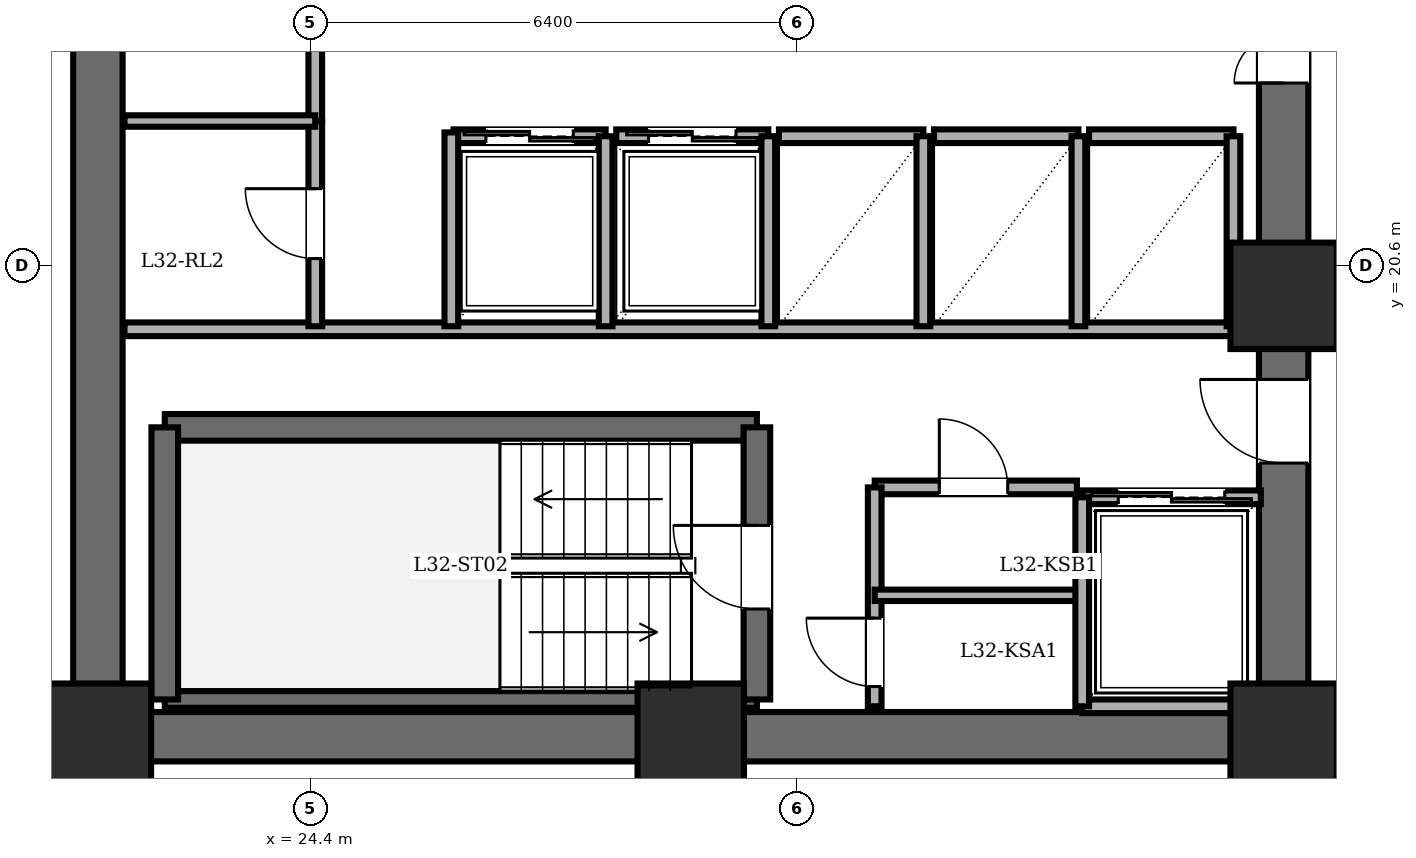
"""IFC4 building model, lengths in metres.
Left out: names, types, materials, properties, quantities, classifications, styles, units other than length and angle.
Written with IfcOpenShell. Run it as: python <this file> out.ifc"""

import sys

from ifc_helpers import new_model, si_unit, direction, frame, frame_2d, origin, origin_2d, place, context, subcontext, project, spatial, rectangle, extrude, element, fill, save


model = new_model("IFC4")
c1 = context("Model", 3, precision=1e-05, world=origin(), true_north=direction((0.0, 1.0)))
c2 = subcontext(c1, "Body", "Model", "MODEL_VIEW")
j1 = project(units=[si_unit("LENGTHUNIT", "METRE"), si_unit("PLANEANGLEUNIT", "RADIAN")], contexts=[c1])
p1 = place(None, origin())
s1 = spatial("IfcSite", under=j1, at=p1, CompositionType="ELEMENT")
p2 = place(p1, origin())
s2 = spatial("IfcBuilding", under=s1, at=p2, CompositionType="ELEMENT")
p3 = place(p2, frame((0.0, 0.0, 122.3)))
s3 = spatial("IfcBuildingStorey", under=s2, at=p3, CompositionType="ELEMENT", Elevation=122.3)
for number, where, z_axis, x_axis in (
    (1, (21.6, 14.4, 0.0), (0.0, 0.0, 1.0), (1.0, 0.0, 0.0)),
    (2, (29.4, 14.4, 0.0), (0.0, 0.0, 1.0), (1.0, 0.0, 0.0)),
    (3, (37.2, 14.4, 0.0), (0.0, 0.0, 1.0), (1.0, 0.0, 0.0)),
    (4, (37.2, 20.2, 0.0), (0.0, 0.0, 1.0), (1.0, 0.0, 0.0)),
):
    element("IfcColumn", number, at=place(p3, frame(where, z_axis=z_axis, x_axis=x_axis)), inside=s3, PredefinedType="COLUMN", context=c2, shape_type="SweptSolid", body=[
        extrude(rectangle(XDim=1.4, YDim=1.4, at=origin_2d()), origin(), (0.0, 0.0, 1.0), 3.6),
    ])
p4 = place(p3, frame((21.6, 14.4, 0.0), z_axis=(0.0, 0.0, 1.0), x_axis=(0.0, 1.0, 0.0)))
e5 = element("IfcWall", 5, at=p4, inside=s3, PredefinedType="SHEAR", context=c2, shape_type="SweptSolid", body=[
    extrude(rectangle(XDim=19.2, YDim=0.65, at=frame_2d((9.6, 0.0))), origin(), (0.0, 0.0, 1.0), 3.4),
])
p5 = place(p3, frame((37.2, 14.4, 0.0), z_axis=(0.0, 0.0, 1.0), x_axis=(-1.0, 0.0, 0.0)))
e6 = element("IfcWall", 6, at=p5, inside=s3, PredefinedType="SHEAR", context=c2, shape_type="SweptSolid", body=[
    extrude(rectangle(XDim=15.6, YDim=0.65, at=frame_2d((7.8, 0.0))), origin(), (0.0, 0.0, 1.0), 3.4),
])
p6 = place(p3, frame((37.2, 14.4, 0.0), z_axis=(0.0, 0.0, 1.0), x_axis=(0.0, 1.0, 0.0)))
e7 = element("IfcWall", 7, at=p6, inside=s3, PredefinedType="SHEAR", context=c2, shape_type="SweptSolid", body=[
    extrude(rectangle(XDim=19.2, YDim=0.65, at=frame_2d((9.6, 0.0))), origin(), (0.0, 0.0, 1.0), 3.4),
])
p7 = place(p6, frame((15.8, 0.0, 0.0)))
e8 = element("IfcOpeningElement", 8, at=p7, cuts=e7, PredefinedType="OPENING", context=c2, shape_type="SweptSolid", body=[
    extrude(rectangle(XDim=1.15, YDim=2.15, at=frame_2d((0.575, 1.075))), frame((0.0, 0.335, 0.0), z_axis=(0.0, -1.0, 0.0), x_axis=(1.0, 0.0, 0.0)), (0.0, 0.0, 1.0), 0.67),
])
p8 = place(p6, frame((3.6, 0.0, 0.0)))
e9 = element("IfcOpeningElement", 9, at=p8, cuts=e7, PredefinedType="OPENING", context=c2, shape_type="SweptSolid", body=[
    extrude(rectangle(XDim=1.1, YDim=2.15, at=frame_2d((0.55, 1.075))), frame((0.0, 0.335, 0.0), z_axis=(0.0, -1.0, 0.0), x_axis=(1.0, 0.0, 0.0)), (0.0, 0.0, 1.0), 0.67),
])
p9 = place(p6, frame((8.6, 0.0, 0.0)))
e10 = element("IfcOpeningElement", 10, at=p9, cuts=e7, PredefinedType="OPENING", context=c2, shape_type="SweptSolid", body=[
    extrude(rectangle(XDim=1.3, YDim=2.2, at=frame_2d((0.65, 1.1))), frame((0.0, 0.335, 0.0), z_axis=(0.0, -1.0, 0.0), x_axis=(1.0, 0.0, 0.0)), (0.0, 0.0, 1.0), 0.67),
])
p10 = place(p3, frame((22.48, 18.47, 0.0), z_axis=(0.0, 0.0, 1.0), x_axis=(1.0, 0.0, 0.0)))
e11 = element("IfcWall", 11, at=p10, inside=s3, PredefinedType="SOLIDWALL", context=c2, shape_type="SweptSolid", body=[
    extrude(rectangle(XDim=7.79, YDim=0.35, at=frame_2d((3.895, 0.0))), origin(), (0.0, 0.0, 1.0), 3.4),
])
p11 = place(p3, frame((22.48, 14.89, 0.0), z_axis=(0.0, 0.0, 1.0), x_axis=(1.0, 0.0, 0.0)))
e12 = element("IfcWall", 12, at=p11, inside=s3, PredefinedType="PARTITIONING", context=c2, shape_type="SweptSolid", body=[
    extrude(rectangle(XDim=7.79, YDim=0.22, at=frame_2d((3.895, 0.0))), origin(), (0.0, 0.0, 1.0), 3.4),
])
p12 = place(p3, frame((22.48, 14.89, 0.0), z_axis=(0.0, 0.0, 1.0), x_axis=(0.0, 1.0, 0.0)))
e13 = element("IfcWall", 13, at=p12, inside=s3, PredefinedType="SOLIDWALL", context=c2, shape_type="SweptSolid", body=[
    extrude(rectangle(XDim=3.58, YDim=0.35, at=frame_2d((1.79, 0.0))), origin(), (0.0, 0.0, 1.0), 3.4),
])
p13 = place(p3, frame((30.27, 14.89, 0.0), z_axis=(0.0, 0.0, 1.0), x_axis=(0.0, 1.0, 0.0)))
e14 = element("IfcWall", 14, at=p13, inside=s3, PredefinedType="SOLIDWALL", context=c2, shape_type="SweptSolid", body=[
    extrude(rectangle(XDim=3.58, YDim=0.35, at=frame_2d((1.79, 0.0))), origin(), (0.0, 0.0, 1.0), 3.4),
])
p14 = place(p13, frame((1.19, 0.0, 0.0)))
e15 = element("IfcOpeningElement", 15, at=p14, cuts=e14, PredefinedType="OPENING", context=c2, shape_type="SweptSolid", body=[
    extrude(rectangle(XDim=1.1, YDim=2.15, at=frame_2d((0.55, 1.075))), frame((0.0, 0.185, 0.0), z_axis=(0.0, -1.0, 0.0), x_axis=(1.0, 0.0, 0.0)), (0.0, 0.0, 1.0), 0.37),
])
p15 = place(p3, frame((21.95, 19.76, 0.0), z_axis=(0.0, 0.0, 1.0), x_axis=(1.0, 0.0, 0.0)))
e16 = element("IfcWall", 16, at=p15, inside=s3, PredefinedType="PARTITIONING", context=c2, shape_type="SweptSolid", body=[
    extrude(rectangle(XDim=14.87, YDim=0.18, at=frame_2d((7.435, 0.0))), origin(), (0.0, 0.0, 1.0), 3.4),
])
p16 = place(p3, frame((31.82, 17.68, 0.0), z_axis=(0.0, 0.0, 1.0), x_axis=(1.0, 0.0, 0.0)))
e17 = element("IfcWall", 17, at=p16, inside=s3, PredefinedType="PARTITIONING", context=c2, shape_type="SweptSolid", body=[
    extrude(rectangle(XDim=2.66, YDim=0.18, at=frame_2d((1.33, 0.0))), origin(), (0.0, 0.0, 1.0), 3.4),
])
p17 = place(p16, frame((0.85, 0.0, 0.0)))
e18 = element("IfcOpeningElement", 18, at=p17, cuts=e17, PredefinedType="OPENING", context=c2, shape_type="SweptSolid", body=[
    extrude(rectangle(XDim=0.9, YDim=2.05, at=frame_2d((0.45, 1.025))), frame((0.0, 0.1, 0.0), z_axis=(0.0, -1.0, 0.0), x_axis=(1.0, 0.0, 0.0)), (0.0, 0.0, 1.0), 0.2),
])
p18 = place(p3, frame((31.82, 14.8, 0.0), z_axis=(0.0, 0.0, 1.0), x_axis=(0.0, 1.0, 0.0)))
e19 = element("IfcWall", 19, at=p18, inside=s3, PredefinedType="PARTITIONING", context=c2, shape_type="SweptSolid", body=[
    extrude(rectangle(XDim=2.88, YDim=0.18, at=frame_2d((1.44, 0.0))), origin(), (0.0, 0.0, 1.0), 3.4),
])
p19 = place(p18, frame((0.26, 0.0, 0.0)))
e20 = element("IfcOpeningElement", 20, at=p19, cuts=e19, PredefinedType="OPENING", context=c2, shape_type="SweptSolid", body=[
    extrude(rectangle(XDim=0.9, YDim=2.05, at=frame_2d((0.45, 1.025))), frame((0.0, 0.1, 0.0), z_axis=(0.0, -1.0, 0.0), x_axis=(1.0, 0.0, 0.0)), (0.0, 0.0, 1.0), 0.2),
])
p20 = place(p3, frame((31.82, 16.26, 0.0), z_axis=(0.0, 0.0, 1.0), x_axis=(1.0, 0.0, 0.0)))
e21 = element("IfcWall", 21, at=p20, inside=s3, PredefinedType="PARTITIONING", context=c2, shape_type="SweptSolid", body=[
    extrude(rectangle(XDim=2.66, YDim=0.15, at=frame_2d((1.33, 0.0))), origin(), (0.0, 0.0, 1.0), 3.4),
])
p21 = place(p3, frame((34.55, 17.55, 0.0), z_axis=(0.0, 0.0, 1.0), x_axis=(1.0, 0.0, 0.0)))
e22 = element("IfcWall", 22, at=p21, inside=s3, PredefinedType="PARTITIONING", context=c2, shape_type="SweptSolid", body=[
    extrude(rectangle(XDim=2.35, YDim=0.18, at=frame_2d((1.175, 0.0))), origin(), (0.0, 0.0, 1.0), 3.4),
])
p22 = place(p21, frame((0.475, 0.0, 0.0)))
e23 = element("IfcOpeningElement", 23, at=p22, cuts=e22, PredefinedType="OPENING", context=c2, shape_type="SweptSolid", body=[
    extrude(rectangle(XDim=1.4, YDim=2.3, at=frame_2d((0.7, 1.15))), frame((0.0, 0.1, 0.0), z_axis=(0.0, -1.0, 0.0), x_axis=(1.0, 0.0, 0.0)), (0.0, 0.0, 1.0), 0.2),
])
p23 = place(p3, frame((36.9, 14.8, 0.0), z_axis=(0.0, 0.0, 1.0), x_axis=(-1.0, 0.0, 0.0)))
e24 = element("IfcWall", 24, at=p23, inside=s3, PredefinedType="PARTITIONING", context=c2, shape_type="SweptSolid", body=[
    extrude(rectangle(XDim=2.35, YDim=0.18, at=frame_2d((1.175, 0.0))), origin(), (0.0, 0.0, 1.0), 3.4),
])
p24 = place(p3, frame((34.55, 17.55, 0.0), z_axis=(0.0, 0.0, 1.0), x_axis=(0.0, -1.0, 0.0)))
e25 = element("IfcWall", 25, at=p24, inside=s3, PredefinedType="PARTITIONING", context=c2, shape_type="SweptSolid", body=[
    extrude(rectangle(XDim=2.75, YDim=0.18, at=frame_2d((1.375, 0.0))), origin(), (0.0, 0.0, 1.0), 3.4),
])
p25 = place(p3, frame((26.28, 22.3, 0.0), z_axis=(0.0, 0.0, 1.0), x_axis=(1.0, 0.0, 0.0)))
e26 = element("IfcWall", 26, at=p25, inside=s3, PredefinedType="PARTITIONING", context=c2, shape_type="SweptSolid", body=[
    extrude(rectangle(XDim=2.0, YDim=0.18, at=frame_2d((1.0, 0.0))), origin(), (0.0, 0.0, 1.0), 3.4),
])
p26 = place(p25, frame((0.425, 0.0, 0.0)))
e27 = element("IfcOpeningElement", 27, at=p26, cuts=e26, PredefinedType="OPENING", context=c2, shape_type="SweptSolid", body=[
    extrude(rectangle(XDim=1.15, YDim=2.2, at=frame_2d((0.575, 1.1))), frame((0.0, 0.1, 0.0), z_axis=(0.0, -1.0, 0.0), x_axis=(1.0, 0.0, 0.0)), (0.0, 0.0, 1.0), 0.2),
])
p27 = place(p3, frame((28.28, 19.8, 0.0), z_axis=(0.0, 0.0, 1.0), x_axis=(0.0, 1.0, 0.0)))
e28 = element("IfcWall", 28, at=p27, inside=s3, PredefinedType="PARTITIONING", context=c2, shape_type="SweptSolid", body=[
    extrude(rectangle(XDim=2.5, YDim=0.18, at=frame_2d((1.25, 0.0))), origin(), (0.0, 0.0, 1.0), 3.4),
])
p28 = place(p3, frame((28.42, 22.3, 0.0), z_axis=(0.0, 0.0, 1.0), x_axis=(1.0, 0.0, 0.0)))
e29 = element("IfcWall", 29, at=p28, inside=s3, PredefinedType="PARTITIONING", context=c2, shape_type="SweptSolid", body=[
    extrude(rectangle(XDim=2.0, YDim=0.18, at=frame_2d((1.0, 0.0))), origin(), (0.0, 0.0, 1.0), 3.4),
])
p29 = place(p28, frame((0.425, 0.0, 0.0)))
e30 = element("IfcOpeningElement", 30, at=p29, cuts=e29, PredefinedType="OPENING", context=c2, shape_type="SweptSolid", body=[
    extrude(rectangle(XDim=1.15, YDim=2.2, at=frame_2d((0.575, 1.1))), frame((0.0, 0.1, 0.0), z_axis=(0.0, -1.0, 0.0), x_axis=(1.0, 0.0, 0.0)), (0.0, 0.0, 1.0), 0.2),
])
p30 = place(p3, frame((30.42, 19.8, 0.0), z_axis=(0.0, 0.0, 1.0), x_axis=(0.0, 1.0, 0.0)))
e31 = element("IfcWall", 31, at=p30, inside=s3, PredefinedType="PARTITIONING", context=c2, shape_type="SweptSolid", body=[
    extrude(rectangle(XDim=2.5, YDim=0.18, at=frame_2d((1.25, 0.0))), origin(), (0.0, 0.0, 1.0), 3.4),
])
p31 = place(p3, frame((30.56, 22.3, 0.0), z_axis=(0.0, 0.0, 1.0), x_axis=(1.0, 0.0, 0.0)))
e32 = element("IfcWall", 32, at=p31, inside=s3, PredefinedType="PARTITIONING", context=c2, shape_type="SweptSolid", body=[
    extrude(rectangle(XDim=1.9, YDim=0.18, at=frame_2d((0.95, 0.0))), origin(), (0.0, 0.0, 1.0), 3.4),
])
p32 = place(p3, frame((32.46, 19.8, 0.0), z_axis=(0.0, 0.0, 1.0), x_axis=(0.0, 1.0, 0.0)))
e33 = element("IfcWall", 33, at=p32, inside=s3, PredefinedType="PARTITIONING", context=c2, shape_type="SweptSolid", body=[
    extrude(rectangle(XDim=2.5, YDim=0.18, at=frame_2d((1.25, 0.0))), origin(), (0.0, 0.0, 1.0), 3.4),
])
p33 = place(p3, frame((32.6, 22.3, 0.0), z_axis=(0.0, 0.0, 1.0), x_axis=(1.0, 0.0, 0.0)))
e34 = element("IfcWall", 34, at=p33, inside=s3, PredefinedType="PARTITIONING", context=c2, shape_type="SweptSolid", body=[
    extrude(rectangle(XDim=1.9, YDim=0.18, at=frame_2d((0.95, 0.0))), origin(), (0.0, 0.0, 1.0), 3.4),
])
p34 = place(p3, frame((34.5, 19.8, 0.0), z_axis=(0.0, 0.0, 1.0), x_axis=(0.0, 1.0, 0.0)))
e35 = element("IfcWall", 35, at=p34, inside=s3, PredefinedType="PARTITIONING", context=c2, shape_type="SweptSolid", body=[
    extrude(rectangle(XDim=2.5, YDim=0.18, at=frame_2d((1.25, 0.0))), origin(), (0.0, 0.0, 1.0), 3.4),
])
p35 = place(p3, frame((34.64, 22.3, 0.0), z_axis=(0.0, 0.0, 1.0), x_axis=(1.0, 0.0, 0.0)))
e36 = element("IfcWall", 36, at=p35, inside=s3, PredefinedType="PARTITIONING", context=c2, shape_type="SweptSolid", body=[
    extrude(rectangle(XDim=1.9, YDim=0.18, at=frame_2d((0.95, 0.0))), origin(), (0.0, 0.0, 1.0), 3.4),
])
p36 = place(p3, frame((36.54, 19.8, 0.0), z_axis=(0.0, 0.0, 1.0), x_axis=(0.0, 1.0, 0.0)))
e37 = element("IfcWall", 37, at=p36, inside=s3, PredefinedType="PARTITIONING", context=c2, shape_type="SweptSolid", body=[
    extrude(rectangle(XDim=2.5, YDim=0.18, at=frame_2d((1.25, 0.0))), origin(), (0.0, 0.0, 1.0), 3.4),
])
p37 = place(p3, frame((24.46, 22.5, 0.0), z_axis=(0.0, 0.0, 1.0), x_axis=(0.0, 1.0, 0.0)))
e38 = element("IfcWall", 38, at=p37, inside=s3, PredefinedType="PARTITIONING", context=c2, shape_type="SweptSolid", body=[
    extrude(rectangle(XDim=5.0, YDim=0.18, at=frame_2d((2.5, 0.0))), origin(), (0.0, 0.0, 1.0), 3.4),
])
p38 = place(p37, frame((2.04, 0.0, 0.0)))
e39 = element("IfcOpeningElement", 39, at=p38, cuts=e38, PredefinedType="OPENING", context=c2, shape_type="SweptSolid", body=[
    extrude(rectangle(XDim=0.92, YDim=2.1, at=frame_2d((0.46, 1.05))), frame((0.0, 0.1, 0.0), z_axis=(0.0, -1.0, 0.0), x_axis=(1.0, 0.0, 0.0)), (0.0, 0.0, 1.0), 0.2),
])
p39 = place(p3, frame((24.46, 19.8, 0.0), z_axis=(0.0, 0.0, 1.0), x_axis=(0.0, 1.0, 0.0)))
e40 = element("IfcWall", 40, at=p39, inside=s3, PredefinedType="PARTITIONING", context=c2, shape_type="SweptSolid", body=[
    extrude(rectangle(XDim=2.7, YDim=0.18, at=frame_2d((1.35, 0.0))), origin(), (0.0, 0.0, 1.0), 3.4),
])
p40 = place(p39, frame((0.89, 0.0, 0.0)))
e41 = element("IfcOpeningElement", 41, at=p40, cuts=e40, PredefinedType="OPENING", context=c2, shape_type="SweptSolid", body=[
    extrude(rectangle(XDim=0.92, YDim=2.1, at=frame_2d((0.46, 1.05))), frame((0.0, 0.1, 0.0), z_axis=(0.0, -1.0, 0.0), x_axis=(1.0, 0.0, 0.0)), (0.0, 0.0, 1.0), 0.2),
])
p41 = place(p3, frame((21.95, 22.5, 0.0), z_axis=(0.0, 0.0, 1.0), x_axis=(1.0, 0.0, 0.0)))
e42 = element("IfcWall", 42, at=p41, inside=s3, PredefinedType="PARTITIONING", context=c2, shape_type="SweptSolid", body=[
    extrude(rectangle(XDim=2.51, YDim=0.15, at=frame_2d((1.255, 0.0))), origin(), (0.0, 0.0, 1.0), 3.4),
])
p42 = place(p3, frame((26.25, 19.8, 0.0), z_axis=(0.0, 0.0, 1.0), x_axis=(0.0, 1.0, 0.0)))
e43 = element("IfcWall", 43, at=p42, inside=s3, PredefinedType="PARTITIONING", context=c2, shape_type="SweptSolid", body=[
    extrude(rectangle(XDim=2.55, YDim=0.18, at=frame_2d((1.275, 0.0))), origin(), (0.0, 0.0, 1.0), 3.4),
])
p43 = place(p3, frame((8.8, 14.18, 0.0), z_axis=(0.0, 0.0, 1.0), x_axis=(1.0, 0.0, 0.0)))
e44 = element("IfcWall", 44, at=p43, inside=s3, PredefinedType="PARTITIONING", context=c2, shape_type="SweptSolid", body=[
    extrude(rectangle(XDim=12.68, YDim=0.15, at=frame_2d((6.34, 0.0))), origin(), (0.0, 0.0, 1.0), 3.4),
])
p44 = place(p43, frame((6.18, 0.0, 0.0)))
e45 = element("IfcOpeningElement", 45, at=p44, cuts=e44, PredefinedType="OPENING", context=c2, shape_type="SweptSolid", body=[
    extrude(rectangle(XDim=1.0, YDim=2.15, at=frame_2d((0.5, 1.075))), frame((0.0, 0.085, 0.0), z_axis=(0.0, -1.0, 0.0), x_axis=(1.0, 0.0, 0.0)), (0.0, 0.0, 1.0), 0.17),
])
p45 = place(p14, origin())
e46 = element("IfcDoor", 46, at=p45, inside=s3, OperationType="SINGLE_SWING_RIGHT", PredefinedType="DOOR", context=c2, shape_type="SweptSolid", body=[
    extrude(rectangle(XDim=1.1, YDim=2.15, at=frame_2d((0.55, 1.075))), frame((0.0, 0.025, 0.0), z_axis=(0.0, -1.0, 0.0), x_axis=(1.0, 0.0, 0.0)), (0.0, 0.0, 1.0), 0.05),
])
fill(e15, e46)
p46 = place(p8, origin())
e47 = element("IfcDoor", 47, at=p46, inside=s3, OperationType="SINGLE_SWING_RIGHT", PredefinedType="DOOR", context=c2, shape_type="SweptSolid", body=[
    extrude(rectangle(XDim=1.1, YDim=2.15, at=frame_2d((0.55, 1.075))), frame((0.0, 0.025, 0.0), z_axis=(0.0, -1.0, 0.0), x_axis=(1.0, 0.0, 0.0)), (0.0, 0.0, 1.0), 0.05),
])
fill(e9, e47)
p47 = place(p17, origin())
e48 = element("IfcDoor", 48, at=p47, inside=s3, OperationType="SINGLE_SWING_LEFT", PredefinedType="DOOR", context=c2, shape_type="SweptSolid", body=[
    extrude(rectangle(XDim=0.9, YDim=2.05, at=frame_2d((0.45, 1.025))), frame((0.0, 0.025, 0.0), z_axis=(0.0, -1.0, 0.0), x_axis=(1.0, 0.0, 0.0)), (0.0, 0.0, 1.0), 0.05),
])
fill(e18, e48)
p48 = place(p19, origin())
e49 = element("IfcDoor", 49, at=p48, inside=s3, OperationType="SINGLE_SWING_RIGHT", PredefinedType="DOOR", context=c2, shape_type="SweptSolid", body=[
    extrude(rectangle(XDim=0.9, YDim=2.05, at=frame_2d((0.45, 1.025))), frame((0.0, 0.025, 0.0), z_axis=(0.0, -1.0, 0.0), x_axis=(1.0, 0.0, 0.0)), (0.0, 0.0, 1.0), 0.05),
])
fill(e20, e49)
p49 = place(p22, origin())
e50 = element("IfcDoor", 50, at=p49, inside=s3, OperationType="DOUBLE_DOOR_SLIDING", PredefinedType="DOOR", context=c2, shape_type="SweptSolid", body=[
    extrude(rectangle(XDim=1.4, YDim=2.3, at=frame_2d((0.7, 1.15))), frame((0.0, 0.025, 0.0), z_axis=(0.0, -1.0, 0.0), x_axis=(1.0, 0.0, 0.0)), (0.0, 0.0, 1.0), 0.05),
])
fill(e23, e50)
p50 = place(p26, origin())
e51 = element("IfcDoor", 51, at=p50, inside=s3, OperationType="DOUBLE_DOOR_SLIDING", PredefinedType="DOOR", context=c2, shape_type="SweptSolid", body=[
    extrude(rectangle(XDim=1.15, YDim=2.2, at=frame_2d((0.575, 1.1))), frame((0.0, 0.025, 0.0), z_axis=(0.0, -1.0, 0.0), x_axis=(1.0, 0.0, 0.0)), (0.0, 0.0, 1.0), 0.05),
])
fill(e27, e51)
p51 = place(p29, origin())
e52 = element("IfcDoor", 52, at=p51, inside=s3, OperationType="DOUBLE_DOOR_SLIDING", PredefinedType="DOOR", context=c2, shape_type="SweptSolid", body=[
    extrude(rectangle(XDim=1.15, YDim=2.2, at=frame_2d((0.575, 1.1))), frame((0.0, 0.025, 0.0), z_axis=(0.0, -1.0, 0.0), x_axis=(1.0, 0.0, 0.0)), (0.0, 0.0, 1.0), 0.05),
])
fill(e30, e52)
p52 = place(p40, origin())
e53 = element("IfcDoor", 53, at=p52, inside=s3, OperationType="SINGLE_SWING_RIGHT", PredefinedType="DOOR", context=c2, shape_type="SweptSolid", body=[
    extrude(rectangle(XDim=0.92, YDim=2.1, at=frame_2d((0.46, 1.05))), frame((0.0, 0.025, 0.0), z_axis=(0.0, -1.0, 0.0), x_axis=(1.0, 0.0, 0.0)), (0.0, 0.0, 1.0), 0.05),
])
fill(e41, e53)
p53 = place(p9, origin())
e54 = element("IfcDoor", 54, at=p53, inside=s3, OperationType="DOUBLE_DOOR_SINGLE_SWING", PredefinedType="DOOR", context=c2, shape_type="SweptSolid", body=[
    extrude(rectangle(XDim=1.3, YDim=2.2, at=frame_2d((0.65, 1.1))), frame((0.0, 0.025, 0.0), z_axis=(0.0, -1.0, 0.0), x_axis=(1.0, 0.0, 0.0)), (0.0, 0.0, 1.0), 0.05),
])
fill(e10, e54)
save(model, sys.argv[1])
